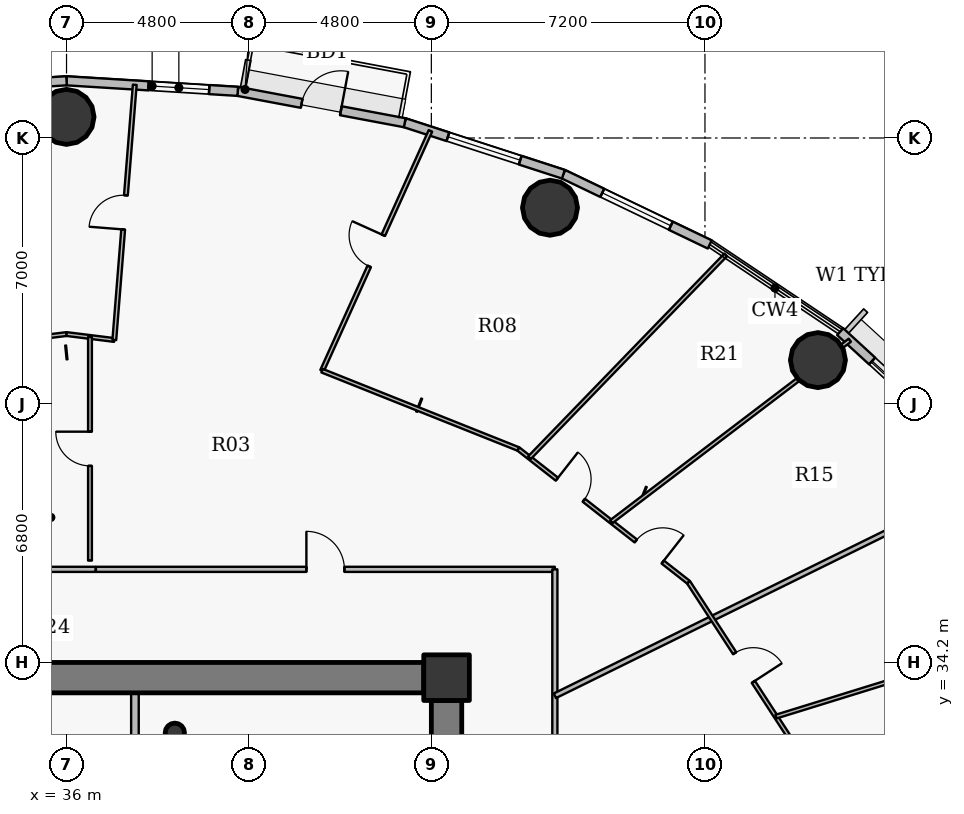
"""IFC4 building model, lengths in metres.
Left out: names, types, materials, properties, quantities, classifications, styles, units other than length and angle.
Written with IfcOpenShell. Run it as: python <this file> out.ifc"""

import sys

from ifc_helpers import new_model, si_unit, direction, frame, frame_2d, origin, origin_2d, place, context, subcontext, project, spatial, rectangle, hollow_circle, extrude, source, transform, mapped, element, fill, save


model = new_model("IFC4")
c1 = context("Model", 3, precision=1e-05, world=origin(), true_north=direction((0.0, 1.0)))
c2 = subcontext(c1, "Body", "Model", "MODEL_VIEW")
j1 = project(units=[si_unit("LENGTHUNIT", "METRE"), si_unit("PLANEANGLEUNIT", "RADIAN")], contexts=[c1])
p1 = place(None, origin())
s1 = spatial("IfcSite", under=j1, at=p1, CompositionType="ELEMENT")
p2 = place(p1, origin())
s2 = spatial("IfcBuilding", under=s1, at=p2, CompositionType="ELEMENT")
p3 = place(p2, frame((0.0, 0.0, 134.7)))
s3 = spatial("IfcBuildingStorey", under=s2, at=p3, CompositionType="ELEMENT", Elevation=134.7)
p4 = place(p3, frame((46.0, 33.8, 0.0), z_axis=(0.0, 0.0, 1.0), x_axis=(1.0, 0.0, 0.0)))
e1 = element("IfcColumn", 1, at=p4, inside=s3, PredefinedType="COLUMN", context=c2, shape_type="SweptSolid", body=[
    extrude(rectangle(XDim=1.2, YDim=1.2, at=origin_2d()), origin(), (0.0, 0.0, 1.0), 3.75),
])
p5 = place(p3, frame((38.85, 32.35, 0.0), z_axis=(0.0, 0.0, 1.0), x_axis=(1.0, 0.0, 0.0)))
e2 = element("IfcColumn", 2, at=p5, inside=s3, PredefinedType="COLUMN", context=c2, shape_type="SweptSolid", body=[
    extrude(hollow_circle(Radius=0.254, WallThickness=0.02, at=origin_2d()), origin(), (0.0, 0.0, 1.0), 3.75),
])
p6 = place(p3, frame((26.6, 33.8, 0.0), z_axis=(0.0, 0.0, 1.0), x_axis=(1.0, 0.0, 0.0)))
e3 = element("IfcWall", 3, at=p6, inside=s3, PredefinedType="SHEAR", context=c2, shape_type="SweptSolid", body=[
    extrude(rectangle(XDim=18.8, YDim=0.8, at=frame_2d((9.4, 0.0))), origin(), (0.0, 0.0, 1.0), 2.95),
])
p7 = place(p3, frame((46.0, 33.2, 0.0), z_axis=(0.0, 0.0, 1.0), x_axis=(0.0, -1.0, 0.0)))
e4 = element("IfcWall", 4, at=p7, inside=s3, PredefinedType="SHEAR", context=c2, shape_type="SweptSolid", body=[
    extrude(rectangle(XDim=12.4, YDim=0.8, at=frame_2d((6.2, 0.0))), origin(), (0.0, 0.0, 1.0), 2.95),
])
p8 = place(p7, frame((5.79, 0.0, 0.0)))
e5 = element("IfcOpeningElement", 5, at=p8, cuts=e4, PredefinedType="OPENING", context=c2, shape_type="SweptSolid", body=[
    extrude(rectangle(XDim=0.82, YDim=2.1, at=origin_2d()), frame((0.41, 0.41, 1.05), z_axis=(0.0, -1.0, 0.0), x_axis=(1.0, 0.0, 0.0)), (0.0, 0.0, 1.0), 0.82),
])
for number, where, z_axis, x_axis in (
    (6, (55.773, 42.156, 0.0), (0.0, 0.0, 1.0), (1.0, 0.0, 0.0)),
    (7, (48.722, 46.165, 0.0), (0.0, 0.0, 1.0), (1.0, 0.0, 0.0)),
    (8, (36.0, 48.555, 0.0), (0.0, 0.0, 1.0), (1.0, 0.0, 0.0)),
):
    element("IfcColumn", number, at=place(p3, frame(where, z_axis=z_axis, x_axis=x_axis)), inside=s3, PredefinedType="COLUMN", context=c2, shape_type="SweptSolid", body=[
        extrude(hollow_circle(Radius=0.725, WallThickness=0.042, at=origin_2d()), origin(), (0.0, 0.0, 1.0), 3.75),
    ])
p9 = place(p3, frame((56.358, 42.903, 0.0), z_axis=(0.0, 0.0, 1.0), x_axis=(0.737113356241, -0.675769117414, 0.0)))
e9 = element("IfcWall", 9, at=p9, inside=s3, PredefinedType="SOLIDWALL", context=c2, shape_type="SweptSolid", body=[
    extrude(rectangle(XDim=3.976, YDim=0.24, at=frame_2d((1.988, 0.0))), origin(), (0.0, 0.0, 1.0), 3.5),
])
p10 = place(p9, frame((1.141, 0.0, 0.9)))
e10 = element("IfcOpeningElement", 10, at=p10, cuts=e9, PredefinedType="OPENING", context=c2, shape_type="SweptSolid", body=[
    extrude(rectangle(XDim=2.0, YDim=1.75, at=origin_2d()), frame((1.0, 0.13, 0.875), z_axis=(0.0, -1.0, 0.0), x_axis=(1.0, 0.0, 0.0)), (0.0, 0.0, 1.0), 0.26),
])
p11 = place(p3, frame((49.074, 47.047, 0.0), z_axis=(0.0, 0.0, 1.0), x_axis=(0.901589935876, -0.432591709962, 0.0)))
e11 = element("IfcWall", 11, at=p11, inside=s3, PredefinedType="SOLIDWALL", context=c2, shape_type="SweptSolid", body=[
    extrude(rectangle(XDim=4.272, YDim=0.24, at=frame_2d((2.136, 0.0))), origin(), (0.0, 0.0, 1.0), 3.5),
])
p12 = place(p11, frame((1.136, 0.0, 0.9)))
e12 = element("IfcOpeningElement", 12, at=p12, cuts=e11, PredefinedType="OPENING", context=c2, shape_type="SweptSolid", body=[
    extrude(rectangle(XDim=2.0, YDim=1.75, at=origin_2d()), frame((1.0, 0.13, 0.875), z_axis=(0.0, -1.0, 0.0), x_axis=(1.0, 0.0, 0.0)), (0.0, 0.0, 1.0), 0.26),
])
p13 = place(p3, frame((44.9, 48.401, 0.0), z_axis=(0.0, 0.0, 1.0), x_axis=(0.951211346073, -0.308540070495, 0.0)))
e13 = element("IfcWall", 13, at=p13, inside=s3, PredefinedType="SOLIDWALL", context=c2, shape_type="SweptSolid", body=[
    extrude(rectangle(XDim=4.388, YDim=0.24, at=frame_2d((2.194, 0.0))), origin(), (0.0, 0.0, 1.0), 3.5),
])
p14 = place(p13, frame((1.194, 0.0, 0.9)))
e14 = element("IfcOpeningElement", 14, at=p14, cuts=e13, PredefinedType="OPENING", context=c2, shape_type="SweptSolid", body=[
    extrude(rectangle(XDim=2.0, YDim=1.75, at=origin_2d()), frame((1.0, 0.13, 0.875), z_axis=(0.0, -1.0, 0.0), x_axis=(1.0, 0.0, 0.0)), (0.0, 0.0, 1.0), 0.26),
])
p15 = place(p3, frame((40.506, 49.227, 0.0), z_axis=(0.0, 0.0, 1.0), x_axis=(0.982789252177, -0.184730305596, 0.0)))
e15 = element("IfcWall", 15, at=p15, inside=s3, PredefinedType="SOLIDWALL", context=c2, shape_type="SweptSolid", body=[
    extrude(rectangle(XDim=4.471, YDim=0.24, at=frame_2d((2.235, 0.0))), origin(), (0.0, 0.0, 1.0), 3.5),
])
p16 = place(p15, frame((1.711, 0.0, 0.0)))
e16 = element("IfcOpeningElement", 16, at=p16, cuts=e15, PredefinedType="OPENING", context=c2, shape_type="SweptSolid", body=[
    extrude(rectangle(XDim=1.05, YDim=2.15, at=origin_2d()), frame((0.525, 0.13, 1.075), z_axis=(0.0, -1.0, 0.0), x_axis=(1.0, 0.0, 0.0)), (0.0, 0.0, 1.0), 0.26),
])
p17 = place(p3, frame((36.0, 49.505, 0.0), z_axis=(0.0, 0.0, 1.0), x_axis=(0.998107531589, -0.061492726276, 0.0)))
e17 = element("IfcWall", 17, at=p17, inside=s3, PredefinedType="SOLIDWALL", context=c2, shape_type="SweptSolid", body=[
    extrude(rectangle(XDim=4.514, YDim=0.24, at=frame_2d((2.257, 0.0))), origin(), (0.0, 0.0, 1.0), 3.5),
])
p18 = place(p17, frame((2.161, 0.0, 0.9)))
e18 = element("IfcOpeningElement", 18, at=p18, cuts=e17, PredefinedType="OPENING", context=c2, shape_type="SweptSolid", body=[
    extrude(rectangle(XDim=1.6, YDim=1.75, at=origin_2d()), frame((0.8, 0.13, 0.875), z_axis=(0.0, -1.0, 0.0), x_axis=(1.0, 0.0, 0.0)), (0.0, 0.0, 1.0), 0.26),
])
p19 = place(p3, frame((31.494, 49.227, 0.0), z_axis=(0.0, 0.0, 1.0), x_axis=(0.998107531589, 0.061492726276, 0.0)))
e19 = element("IfcWall", 19, at=p19, inside=s3, PredefinedType="SOLIDWALL", context=c2, shape_type="SweptSolid", body=[
    extrude(rectangle(XDim=4.514, YDim=0.24, at=frame_2d((2.257, 0.0))), origin(), (0.0, 0.0, 1.0), 3.5),
])
p20 = place(p19, frame((1.257, 0.0, 0.9)))
e20 = element("IfcOpeningElement", 20, at=p20, cuts=e19, PredefinedType="OPENING", context=c2, shape_type="SweptSolid", body=[
    extrude(rectangle(XDim=2.0, YDim=1.75, at=origin_2d()), frame((1.0, 0.13, 0.875), z_axis=(0.0, -1.0, 0.0), x_axis=(1.0, 0.0, 0.0)), (0.0, 0.0, 1.0), 0.26),
])
p21 = place(p3, frame((29.749, 42.066, 0.0), z_axis=(0.0, 0.0, 1.0), x_axis=(0.992395485088, 0.123090215599, 0.0)))
e21 = element("IfcWall", 21, at=p21, inside=s3, PredefinedType="PARTITIONING", context=c2, shape_type="SweptSolid", body=[
    extrude(rectangle(XDim=6.299, YDim=0.1, at=frame_2d((3.15, 0.0))), origin(), (0.0, 0.0, 1.0), 2.935),
])
p22 = place(p3, frame((36.0, 42.841, 0.0), z_axis=(0.0, 0.0, 1.0), x_axis=(0.992384274499, -0.123180565541, 0.0)))
e22 = element("IfcWall", 22, at=p22, inside=s3, PredefinedType="PARTITIONING", context=c2, shape_type="SweptSolid", body=[
    extrude(rectangle(XDim=1.267, YDim=0.1, at=frame_2d((0.633, 0.0))), origin(), (0.0, 0.0, 1.0), 2.935),
])
p23 = place(p3, frame((36.617, 36.881, 0.0), z_axis=(0.0, 0.0, 1.0), x_axis=(0.0, 1.0, 0.0)))
e23 = element("IfcWall", 23, at=p23, inside=s3, PredefinedType="PARTITIONING", context=c2, shape_type="SweptSolid", body=[
    extrude(rectangle(XDim=5.884, YDim=0.1, at=frame_2d((2.942, 0.0))), origin(), (0.0, 0.0, 1.0), 3.5),
])
p24 = place(p23, frame((2.492, 0.0, 0.0)))
e24 = element("IfcOpeningElement", 24, at=p24, cuts=e23, PredefinedType="OPENING", context=c2, shape_type="SweptSolid", body=[
    extrude(rectangle(XDim=0.9, YDim=2.1, at=origin_2d()), frame((0.45, 0.06, 1.05), z_axis=(0.0, -1.0, 0.0), x_axis=(1.0, 0.0, 0.0)), (0.0, 0.0, 1.0), 0.12),
])
p25 = place(p3, frame((36.774, 36.65, 0.0), z_axis=(0.0, 0.0, 1.0), x_axis=(1.0, 0.0, 0.0)))
e25 = element("IfcWall", 25, at=p25, inside=s3, PredefinedType="PARTITIONING", context=c2, shape_type="SweptSolid", body=[
    extrude(rectangle(XDim=12.076, YDim=0.135, at=frame_2d((6.038, 0.0))), origin(), (0.0, 0.0, 1.0), 2.935),
])
p26 = place(p25, frame((5.538, 0.0, 0.0)))
e26 = element("IfcOpeningElement", 26, at=p26, cuts=e25, PredefinedType="OPENING", context=c2, shape_type="SweptSolid", body=[
    extrude(rectangle(XDim=1.0, YDim=2.15, at=origin_2d()), frame((0.5, 0.078, 1.075), z_axis=(0.0, -1.0, 0.0), x_axis=(1.0, 0.0, 0.0)), (0.0, 0.0, 1.0), 0.155),
])
p27 = place(p3, frame((37.258, 42.685, 0.0), z_axis=(0.0, 0.0, 1.0), x_axis=(0.079919529762, 0.9968013186, 0.0)))
e27 = element("IfcWall", 27, at=p27, inside=s3, PredefinedType="PARTITIONING", context=c2, shape_type="SweptSolid", body=[
    extrude(rectangle(XDim=6.736, YDim=0.1, at=frame_2d((3.368, 0.0))), origin(), (0.0, 0.0, 1.0), 2.935),
])
p28 = place(p27, frame((2.918, 0.0, 0.0)))
e28 = element("IfcOpeningElement", 28, at=p28, cuts=e27, PredefinedType="OPENING", context=c2, shape_type="SweptSolid", body=[
    extrude(rectangle(XDim=0.9, YDim=2.1, at=origin_2d()), frame((0.45, 0.06, 1.05), z_axis=(0.0, -1.0, 0.0), x_axis=(1.0, 0.0, 0.0)), (0.0, 0.0, 1.0), 0.12),
])
p29 = place(p3, frame((37.8, 31.05, 0.0), z_axis=(0.0, 0.0, 1.0), x_axis=(0.0, 1.0, 0.0)))
e29 = element("IfcWall", 29, at=p29, inside=s3, PredefinedType="PARTITIONING", context=c2, shape_type="SweptSolid", body=[
    extrude(rectangle(XDim=2.35, YDim=0.2, at=frame_2d((1.175, 0.0))), origin(), (0.0, 0.0, 1.0), 3.085),
])
p30 = place(p3, frame((42.724, 41.877, 0.0), z_axis=(0.0, 0.0, 1.0), x_axis=(0.411868207503, 0.911243425023, 0.0)))
e30 = element("IfcWall", 30, at=p30, inside=s3, PredefinedType="PARTITIONING", context=c2, shape_type="SweptSolid", body=[
    extrude(rectangle(XDim=6.925, YDim=0.1, at=frame_2d((3.462, 0.0))), origin(), (0.0, 0.0, 1.0), 2.935),
])
p31 = place(p30, frame((3.012, 0.0, 0.0)))
e31 = element("IfcOpeningElement", 31, at=p31, cuts=e30, PredefinedType="OPENING", context=c2, shape_type="SweptSolid", body=[
    extrude(rectangle(XDim=0.9, YDim=2.1, at=origin_2d()), frame((0.45, 0.06, 1.05), z_axis=(0.0, -1.0, 0.0), x_axis=(1.0, 0.0, 0.0)), (0.0, 0.0, 1.0), 0.12),
])
p32 = place(p3, frame((42.724, 41.877, 0.0), z_axis=(0.0, 0.0, 1.0), x_axis=(0.928806258388, -0.370565695093, 0.0)))
e32 = element("IfcWall", 32, at=p32, inside=s3, PredefinedType="PARTITIONING", context=c2, shape_type="SweptSolid", body=[
    extrude(rectangle(XDim=5.562, YDim=0.1, at=frame_2d((2.781, 0.0))), origin(), (0.0, 0.0, 1.0), 2.935),
])
p33 = place(p3, frame((47.891, 39.816, 0.0), z_axis=(0.0, 0.0, 1.0), x_axis=(0.787347250317, -0.61650977885, 0.0)))
e33 = element("IfcWall", 33, at=p33, inside=s3, PredefinedType="PARTITIONING", context=c2, shape_type="SweptSolid", body=[
    extrude(rectangle(XDim=5.683, YDim=0.1, at=frame_2d((2.842, 0.0))), origin(), (0.0, 0.0, 1.0), 2.935),
])
p34 = place(p33, frame((3.923, 0.0, 0.0)))
e34 = element("IfcOpeningElement", 34, at=p34, cuts=e33, PredefinedType="OPENING", context=c2, shape_type="SweptSolid", body=[
    extrude(rectangle(XDim=0.9, YDim=2.1, at=origin_2d()), frame((0.45, 0.06, 1.05), z_axis=(0.0, -1.0, 0.0), x_axis=(1.0, 0.0, 0.0)), (0.0, 0.0, 1.0), 0.12),
])
p35 = place(p33, frame((1.286, 0.0, 0.0)))
e35 = element("IfcOpeningElement", 35, at=p35, cuts=e33, PredefinedType="OPENING", context=c2, shape_type="SweptSolid", body=[
    extrude(rectangle(XDim=0.9, YDim=2.1, at=origin_2d()), frame((0.45, 0.06, 1.05), z_axis=(0.0, -1.0, 0.0), x_axis=(1.0, 0.0, 0.0)), (0.0, 0.0, 1.0), 0.12),
])
p36 = place(p3, frame((48.182, 39.588, 0.0), z_axis=(0.0, 0.0, 1.0), x_axis=(0.695422522839, 0.718601081775, 0.0)))
e36 = element("IfcWall", 36, at=p36, inside=s3, PredefinedType="PARTITIONING", context=c2, shape_type="SweptSolid", body=[
    extrude(rectangle(XDim=7.426, YDim=0.1, at=frame_2d((3.713, 0.0))), origin(), (0.0, 0.0, 1.0), 2.935),
])
p37 = place(p3, frame((48.85, 17.35, 0.0), z_axis=(0.0, 0.0, 1.0), x_axis=(0.0, 1.0, 0.0)))
e37 = element("IfcWall", 37, at=p37, inside=s3, PredefinedType="PARTITIONING", context=c2, shape_type="SweptSolid", body=[
    extrude(rectangle(XDim=19.3, YDim=0.135, at=frame_2d((9.65, 0.0))), origin(), (0.0, 0.0, 1.0), 2.935),
])
p38 = place(p37, frame((7.609, 0.0, 0.0)))
e38 = element("IfcOpeningElement", 38, at=p38, cuts=e37, PredefinedType="OPENING", context=c2, shape_type="SweptSolid", body=[
    extrude(rectangle(XDim=1.0, YDim=2.15, at=origin_2d()), frame((0.5, 0.078, 1.075), z_axis=(0.0, -1.0, 0.0), x_axis=(1.0, 0.0, 0.0)), (0.0, 0.0, 1.0), 0.155),
])
p39 = place(p3, frame((48.85, 33.323, 0.0), z_axis=(0.0, 0.0, 1.0), x_axis=(0.897255437174, 0.44151181237, 0.0)))
e39 = element("IfcWall", 39, at=p39, inside=s3, PredefinedType="PARTITIONING", context=c2, shape_type="SweptSolid", body=[
    extrude(rectangle(XDim=12.746, YDim=0.135, at=frame_2d((6.373, 0.0))), origin(), (0.0, 0.0, 1.0), 2.935),
])
p40 = place(p3, frame((50.334, 37.903, 0.0), z_axis=(0.0, 0.0, 1.0), x_axis=(0.795918180565, 0.60540420369, 0.0)))
e40 = element("IfcWall", 40, at=p40, inside=s3, PredefinedType="PARTITIONING", context=c2, shape_type="SweptSolid", body=[
    extrude(rectangle(XDim=7.887, YDim=0.1, at=frame_2d((3.944, 0.0))), origin(), (0.0, 0.0, 1.0), 2.935),
])
p41 = place(p3, frame((52.366, 36.311, 0.0), z_axis=(0.0, 0.0, 1.0), x_axis=(0.545405249109, -0.838172484781, 0.0)))
e41 = element("IfcWall", 41, at=p41, inside=s3, PredefinedType="PARTITIONING", context=c2, shape_type="SweptSolid", body=[
    extrude(rectangle(XDim=5.269, YDim=0.1, at=frame_2d((2.634, 0.0))), origin(), (0.0, 0.0, 1.0), 2.935),
])
p42 = place(p41, frame((2.228, 0.0, 0.0)))
e42 = element("IfcOpeningElement", 42, at=p42, cuts=e41, PredefinedType="OPENING", context=c2, shape_type="SweptSolid", body=[
    extrude(rectangle(XDim=0.9, YDim=2.1, at=origin_2d()), frame((0.45, 0.06, 1.05), z_axis=(0.0, -1.0, 0.0), x_axis=(1.0, 0.0, 0.0)), (0.0, 0.0, 1.0), 0.12),
])
p43 = place(p3, frame((54.668, 32.774, 0.0), z_axis=(0.0, 0.0, 1.0), x_axis=(0.955345753083, 0.295490257144, 0.0)))
e43 = element("IfcWall", 43, at=p43, inside=s3, PredefinedType="PARTITIONING", context=c2, shape_type="SweptSolid", body=[
    extrude(rectangle(XDim=8.39, YDim=0.1, at=frame_2d((4.195, 0.0))), origin(), (0.0, 0.0, 1.0), 2.935),
])
p44 = place(p3, frame((33.396, 36.65, 0.0), z_axis=(0.0, 0.0, 1.0), x_axis=(1.0, 0.0, 0.0)))
e44 = element("IfcWall", 44, at=p44, inside=s3, PredefinedType="PARTITIONING", context=c2, shape_type="SweptSolid", body=[
    extrude(rectangle(XDim=3.367, YDim=0.135, at=frame_2d((1.684, 0.0))), origin(), (0.0, 0.0, 1.0), 2.935),
])
p45 = place(p3, frame((46.4, 34.2, 0.0), z_axis=(0.0, 0.0, 1.0), x_axis=(-1.0, 0.0, 0.0)))
e45 = element("IfcWall", 45, at=p45, inside=s3, PredefinedType="PARTITIONING", context=c2, shape_type="SweptSolid", body=[
    extrude(rectangle(XDim=0.99, YDim=0.135, at=frame_2d((0.495, 0.0))), origin(), (0.0, 0.0, 1.0), 2.935),
])
p46 = place(p3, frame((46.4, 33.21, 0.0), z_axis=(0.0, 0.0, 1.0), x_axis=(0.0, 1.0, 0.0)))
e46 = element("IfcWall", 46, at=p46, inside=s3, PredefinedType="PARTITIONING", context=c2, shape_type="SweptSolid", body=[
    extrude(rectangle(XDim=0.683, YDim=0.135, at=frame_2d((0.341, 0.0))), origin(), (0.0, 0.0, 1.0), 3.5),
])
m1 = source(origin(), c2, "Body", "SweptSolid", [
    extrude(rectangle(XDim=2.0, YDim=1.75, at=origin_2d()), frame((1.0, 0.03, 0.875), z_axis=(0.0, -1.0, 0.0), x_axis=(1.0, 0.0, 0.0)), (0.0, 0.0, 1.0), 0.06),
])
p47 = place(p10, origin())
e47 = element("IfcWindow", 47, at=p47, inside=s3, PartitioningType="DOUBLE_PANEL_VERTICAL", PredefinedType="WINDOW", context=c2, shape_type="MappedRepresentation", body=[
    mapped(m1, transform((0.0, 0.0, 0.0), x_axis=(1.0, 0.0, 0.0), y_axis=(0.0, 1.0, 0.0), z_axis=(0.0, 0.0, 1.0), scale=1.0)),
])
fill(e10, e47)
p48 = place(p12, origin())
e48 = element("IfcWindow", 48, at=p48, inside=s3, PartitioningType="DOUBLE_PANEL_VERTICAL", PredefinedType="WINDOW", context=c2, shape_type="MappedRepresentation", body=[
    mapped(m1, transform((0.0, 0.0, 0.0), x_axis=(1.0, 0.0, 0.0), y_axis=(0.0, 1.0, 0.0), z_axis=(0.0, 0.0, 1.0), scale=1.0)),
])
fill(e12, e48)
p49 = place(p14, origin())
e49 = element("IfcWindow", 49, at=p49, inside=s3, PartitioningType="DOUBLE_PANEL_VERTICAL", PredefinedType="WINDOW", context=c2, shape_type="MappedRepresentation", body=[
    mapped(m1, transform((0.0, 0.0, 0.0), x_axis=(1.0, 0.0, 0.0), y_axis=(0.0, 1.0, 0.0), z_axis=(0.0, 0.0, 1.0), scale=1.0)),
])
fill(e14, e49)
m2 = source(origin(), c2, "Body", "SweptSolid", [
    extrude(rectangle(XDim=1.05, YDim=2.15, at=origin_2d()), frame((0.525, 0.025, 1.075), z_axis=(0.0, -1.0, 0.0), x_axis=(1.0, 0.0, 0.0)), (0.0, 0.0, 1.0), 0.05),
])
p50 = place(p16, origin())
e50 = element("IfcDoor", 50, at=p50, inside=s3, OperationType="SINGLE_SWING_RIGHT", PredefinedType="DOOR", context=c2, shape_type="MappedRepresentation", body=[
    mapped(m2, transform((0.0, 0.0, 0.0), x_axis=(1.0, 0.0, 0.0), y_axis=(0.0, 1.0, 0.0), z_axis=(0.0, 0.0, 1.0), scale=1.0)),
])
fill(e16, e50)
m3 = source(origin(), c2, "Body", "SweptSolid", [
    extrude(rectangle(XDim=1.6, YDim=1.75, at=origin_2d()), frame((0.8, 0.03, 0.875), z_axis=(0.0, -1.0, 0.0), x_axis=(1.0, 0.0, 0.0)), (0.0, 0.0, 1.0), 0.06),
])
p51 = place(p18, origin())
e51 = element("IfcWindow", 51, at=p51, inside=s3, PartitioningType="DOUBLE_PANEL_VERTICAL", PredefinedType="WINDOW", context=c2, shape_type="MappedRepresentation", body=[
    mapped(m3, transform((0.0, 0.0, 0.0), x_axis=(1.0, 0.0, 0.0), y_axis=(0.0, 1.0, 0.0), z_axis=(0.0, 0.0, 1.0), scale=1.0)),
])
fill(e18, e51)
m4 = source(origin(), c2, "Body", "SweptSolid", [
    extrude(rectangle(XDim=0.9, YDim=2.1, at=origin_2d()), frame((0.45, 0.025, 1.05), z_axis=(0.0, -1.0, 0.0), x_axis=(1.0, 0.0, 0.0)), (0.0, 0.0, 1.0), 0.05),
])
p52 = place(p42, origin())
e52 = element("IfcDoor", 52, at=p52, inside=s3, OperationType="SINGLE_SWING_RIGHT", PredefinedType="DOOR", context=c2, shape_type="MappedRepresentation", body=[
    mapped(m4, transform((0.0, 0.0, 0.0), x_axis=(1.0, 0.0, 0.0), y_axis=(0.0, 1.0, 0.0), z_axis=(0.0, 0.0, 1.0), scale=1.0)),
])
fill(e42, e52)
m5 = source(origin(), c2, "Body", "SweptSolid", [
    extrude(rectangle(XDim=1.0, YDim=2.15, at=origin_2d()), frame((0.5, 0.025, 1.075), z_axis=(0.0, -1.0, 0.0), x_axis=(1.0, 0.0, 0.0)), (0.0, 0.0, 1.0), 0.05),
])
p53 = place(p26, origin())
e53 = element("IfcDoor", 53, at=p53, inside=s3, OperationType="SINGLE_SWING_LEFT", PredefinedType="DOOR", context=c2, shape_type="MappedRepresentation", body=[
    mapped(m5, transform((0.0, 0.0, 0.0), x_axis=(1.0, 0.0, 0.0), y_axis=(0.0, 1.0, 0.0), z_axis=(0.0, 0.0, 1.0), scale=1.0)),
])
fill(e26, e53)
p54 = place(p34, origin())
e54 = element("IfcDoor", 54, at=p54, inside=s3, OperationType="SINGLE_SWING_RIGHT", PredefinedType="DOOR", context=c2, shape_type="MappedRepresentation", body=[
    mapped(m4, transform((0.0, 0.0, 0.0), x_axis=(1.0, 0.0, 0.0), y_axis=(0.0, 1.0, 0.0), z_axis=(0.0, 0.0, 1.0), scale=1.0)),
])
fill(e34, e54)
p55 = place(p35, origin())
e55 = element("IfcDoor", 55, at=p55, inside=s3, OperationType="SINGLE_SWING_LEFT", PredefinedType="DOOR", context=c2, shape_type="MappedRepresentation", body=[
    mapped(m4, transform((0.0, 0.0, 0.0), x_axis=(1.0, 0.0, 0.0), y_axis=(0.0, 1.0, 0.0), z_axis=(0.0, 0.0, 1.0), scale=1.0)),
])
fill(e35, e55)
p56 = place(p31, origin())
e56 = element("IfcDoor", 56, at=p56, inside=s3, OperationType="SINGLE_SWING_RIGHT", PredefinedType="DOOR", context=c2, shape_type="MappedRepresentation", body=[
    mapped(m4, transform((0.0, 0.0, 0.0), x_axis=(1.0, 0.0, 0.0), y_axis=(0.0, 1.0, 0.0), z_axis=(0.0, 0.0, 1.0), scale=1.0)),
])
fill(e31, e56)
p57 = place(p28, origin())
e57 = element("IfcDoor", 57, at=p57, inside=s3, OperationType="SINGLE_SWING_LEFT", PredefinedType="DOOR", context=c2, shape_type="MappedRepresentation", body=[
    mapped(m4, transform((0.0, 0.0, 0.0), x_axis=(1.0, 0.0, 0.0), y_axis=(0.0, 1.0, 0.0), z_axis=(0.0, 0.0, 1.0), scale=1.0)),
])
fill(e28, e57)
p58 = place(p24, origin())
e58 = element("IfcDoor", 58, at=p58, inside=s3, OperationType="SINGLE_SWING_RIGHT", PredefinedType="DOOR", context=c2, shape_type="MappedRepresentation", body=[
    mapped(m4, transform((0.0, 0.0, 0.0), x_axis=(1.0, 0.0, 0.0), y_axis=(0.0, 1.0, 0.0), z_axis=(0.0, 0.0, 1.0), scale=1.0)),
])
fill(e24, e58)
save(model, sys.argv[1])
